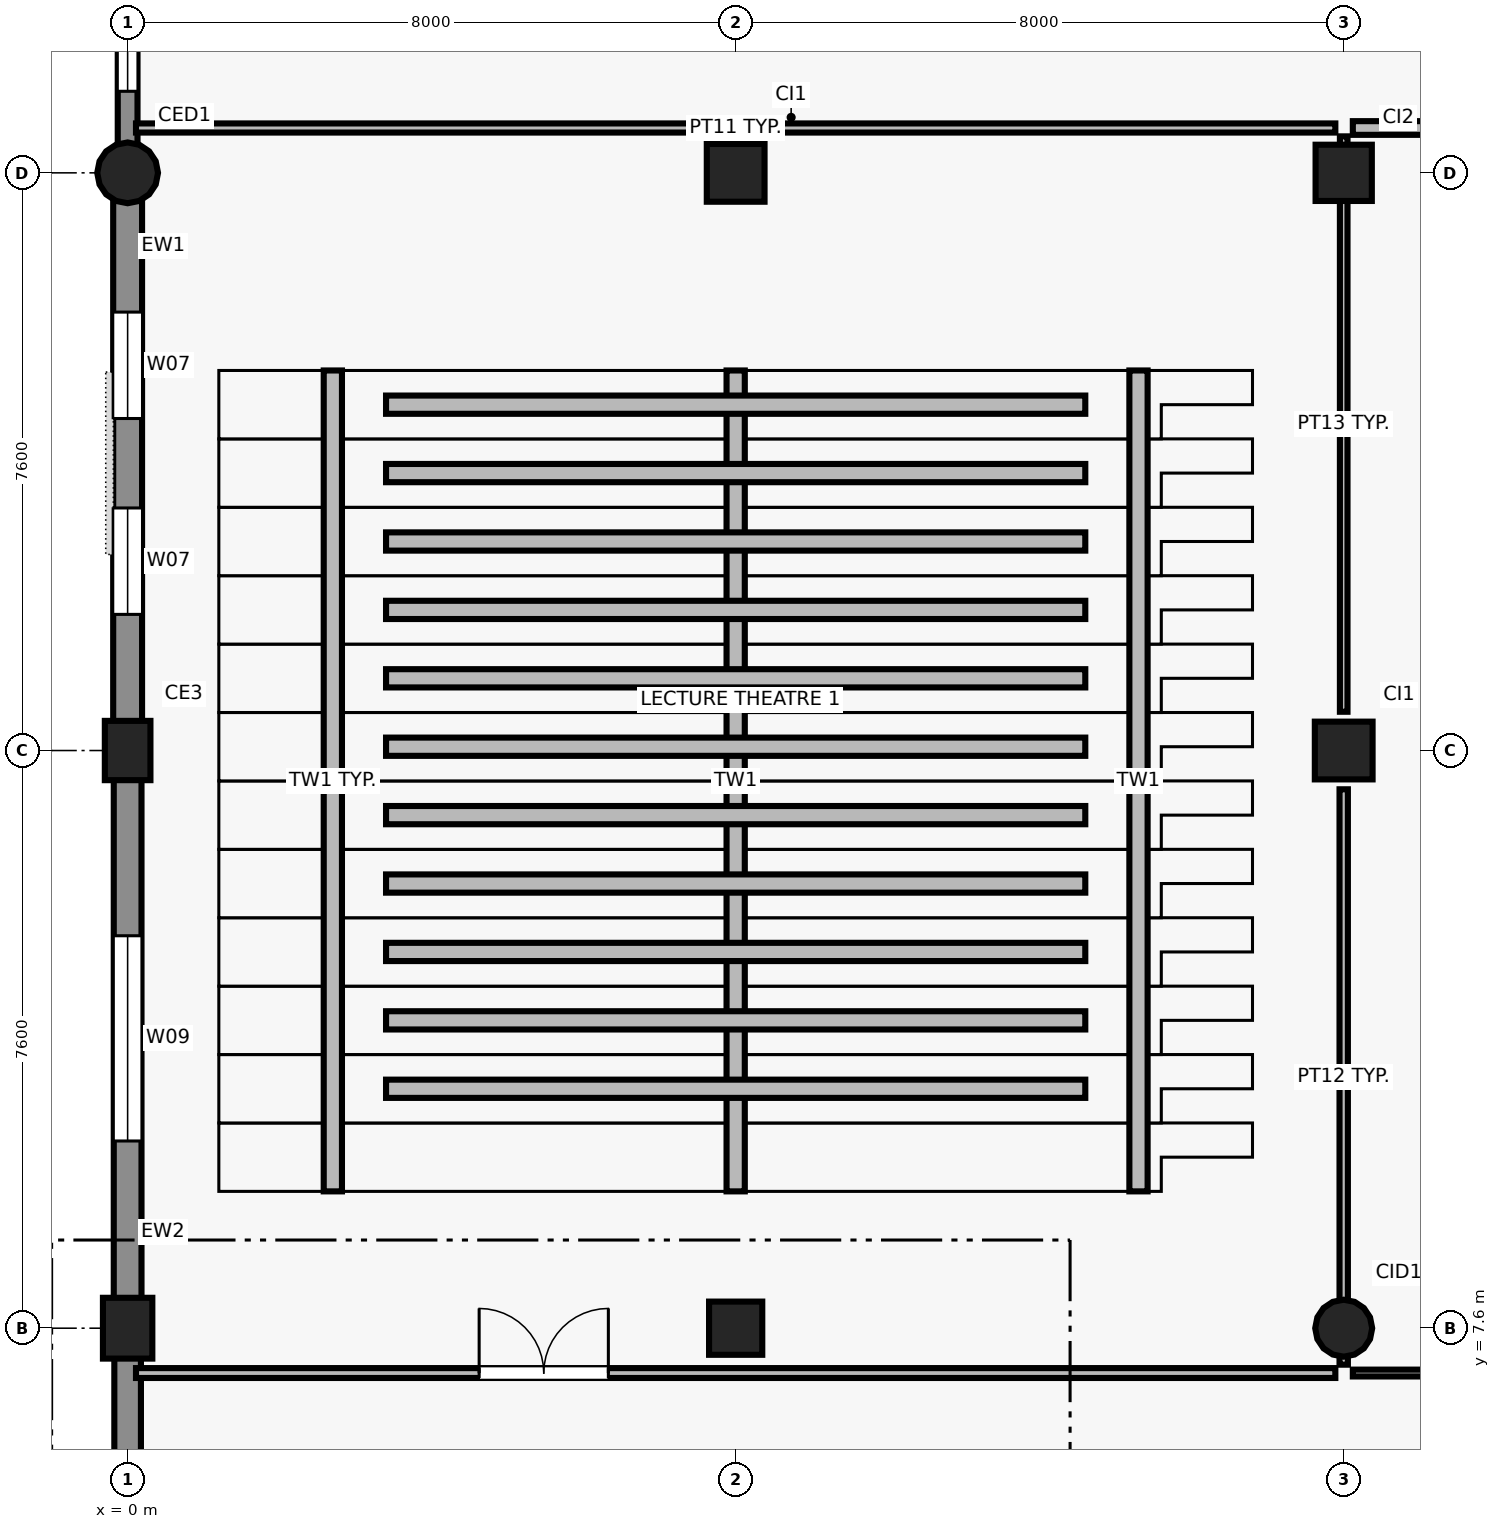
"""IFC4 building model, lengths in metres.
Left out: names, types, materials, properties, quantities, classifications, styles, units other than length and angle.
Written with IfcOpenShell. Run it as: python <this file> out.ifc"""

import sys

from ifc_helpers import new_model, si_unit, direction, frame, frame_2d, origin, origin_2d, place, context, subcontext, project, spatial, polyline, rectangle, circle, outline, extrude, element, fill, save


model = new_model("IFC4")
c1 = context("Model", 3, precision=1e-05, world=origin(), true_north=direction((0.0, 1.0)))
c2 = subcontext(c1, "Body", "Model", "MODEL_VIEW")
j1 = project(units=[si_unit("LENGTHUNIT", "METRE"), si_unit("PLANEANGLEUNIT", "RADIAN")], contexts=[c1])
p1 = place(None, origin())
s1 = spatial("IfcSite", under=j1, at=p1, CompositionType="ELEMENT")
p2 = place(p1, origin())
s2 = spatial("IfcBuilding", under=s1, at=p2, CompositionType="ELEMENT")
p3 = place(p2, origin())
s3 = spatial("IfcBuildingStorey", under=s2, at=p3, CompositionType="ELEMENT", Elevation=0.0)
p4 = place(p3, frame((0.0, 7.6, 0.0), z_axis=(0.0, 0.0, 1.0), x_axis=(1.0, 0.0, 0.0)))
e1 = element("IfcColumn", 1, at=p4, inside=s3, PredefinedType="COLUMN", context=c2, shape_type="SweptSolid", body=[
    extrude(rectangle(XDim=0.8, YDim=0.65, at=origin_2d()), origin(), (0.0, 0.0, 1.0), 4.5),
])
p5 = place(p3, frame((0.0, 15.2, 0.0), z_axis=(0.0, 0.0, 1.0), x_axis=(1.0, 0.0, 0.0)))
e2 = element("IfcColumn", 2, at=p5, inside=s3, PredefinedType="COLUMN", context=c2, shape_type="SweptSolid", body=[
    extrude(rectangle(XDim=0.78, YDim=0.6, at=origin_2d()), origin(), (0.0, 0.0, 1.0), 4.5),
])
p6 = place(p3, frame((0.0, 22.8, 0.0), z_axis=(0.0, 0.0, 1.0), x_axis=(1.0, 0.0, 0.0)))
e3 = element("IfcColumn", 3, at=p6, inside=s3, PredefinedType="COLUMN", context=c2, shape_type="SweptSolid", body=[
    extrude(circle(Radius=0.4, at=origin_2d()), origin(), (0.0, 0.0, 1.0), 4.5),
])
p7 = place(p3, frame((8.0, 7.6, 0.0), z_axis=(0.0, 0.0, 1.0), x_axis=(1.0, 0.0, 0.0)))
e4 = element("IfcColumn", 4, at=p7, inside=s3, PredefinedType="COLUMN", context=c2, shape_type="SweptSolid", body=[
    extrude(rectangle(XDim=0.7, YDim=0.7, at=origin_2d()), origin(), (0.0, 0.0, 1.0), 4.5),
])
p8 = place(p3, frame((8.0, 22.8, 0.0), z_axis=(0.0, 0.0, 1.0), x_axis=(1.0, 0.0, 0.0)))
e5 = element("IfcColumn", 5, at=p8, inside=s3, PredefinedType="COLUMN", context=c2, shape_type="SweptSolid", body=[
    extrude(rectangle(XDim=0.76, YDim=0.76, at=origin_2d()), origin(), (0.0, 0.0, 1.0), 4.5),
])
p9 = place(p3, frame((16.0, 7.6, 0.0), z_axis=(0.0, 0.0, 1.0), x_axis=(1.0, 0.0, 0.0)))
e6 = element("IfcColumn", 6, at=p9, inside=s3, PredefinedType="COLUMN", context=c2, shape_type="SweptSolid", body=[
    extrude(circle(Radius=0.375, at=origin_2d()), origin(), (0.0, 0.0, 1.0), 4.5),
])
p10 = place(p3, frame((16.0, 15.2, 0.0), z_axis=(0.0, 0.0, 1.0), x_axis=(1.0, 0.0, 0.0)))
e7 = element("IfcColumn", 7, at=p10, inside=s3, PredefinedType="COLUMN", context=c2, shape_type="SweptSolid", body=[
    extrude(rectangle(XDim=0.76, YDim=0.76, at=origin_2d()), origin(), (0.0, 0.0, 1.0), 4.5),
])
p11 = place(p3, frame((16.0, 22.8, 0.0), z_axis=(0.0, 0.0, 1.0), x_axis=(1.0, 0.0, 0.0)))
e8 = element("IfcColumn", 8, at=p11, inside=s3, PredefinedType="COLUMN", context=c2, shape_type="SweptSolid", body=[
    extrude(rectangle(XDim=0.74, YDim=0.74, at=origin_2d()), origin(), (0.0, 0.0, 1.0), 4.5),
])
for number, where, z_axis, x_axis in (
    (9, (2.7, 9.4, 0.0), (0.0, 0.0, 1.0), (0.0, 1.0, 0.0)),
    (10, (8.0, 9.4, 0.0), (0.0, 0.0, 1.0), (0.0, 1.0, 0.0)),
    (11, (13.3, 9.4, 0.0), (0.0, 0.0, 1.0), (0.0, 1.0, 0.0)),
):
    element("IfcWall", number, at=place(p3, frame(where, z_axis=z_axis, x_axis=x_axis)), inside=s3, PredefinedType="SOLIDWALL", context=c2, shape_type="SweptSolid", body=[
        extrude(outline(polyline([(0.0, 0.0), (10.8, 0.0), (10.8, 1.615), (0.0, 0.05), (0.0, 0.0)])), frame((0.0, 0.12, 0.0), z_axis=(0.0, -1.0, 0.0), x_axis=(1.0, 0.0, 0.0)), (0.0, 0.0, 1.0), 0.24),
    ])
p12 = place(p3, frame((3.4, 10.75, 0.0), z_axis=(0.0, 0.0, 1.0), x_axis=(1.0, 0.0, 0.0)))
e12 = element("IfcWall", 12, at=p12, inside=s3, PredefinedType="SOLIDWALL", context=c2, shape_type="SweptSolid", body=[
    extrude(rectangle(XDim=9.2, YDim=0.24, at=frame_2d((4.6, 0.0))), origin(), (0.0, 0.0, 1.0), 0.115),
])
p13 = place(p3, frame((3.4, 11.65, 0.0), z_axis=(0.0, 0.0, 1.0), x_axis=(1.0, 0.0, 0.0)))
e13 = element("IfcWall", 13, at=p13, inside=s3, PredefinedType="SOLIDWALL", context=c2, shape_type="SweptSolid", body=[
    extrude(rectangle(XDim=9.2, YDim=0.24, at=frame_2d((4.6, 0.0))), origin(), (0.0, 0.0, 1.0), 0.265),
])
p14 = place(p3, frame((3.4, 12.55, 0.0), z_axis=(0.0, 0.0, 1.0), x_axis=(1.0, 0.0, 0.0)))
e14 = element("IfcWall", 14, at=p14, inside=s3, PredefinedType="SOLIDWALL", context=c2, shape_type="SweptSolid", body=[
    extrude(rectangle(XDim=9.2, YDim=0.24, at=frame_2d((4.6, 0.0))), origin(), (0.0, 0.0, 1.0), 0.415),
])
p15 = place(p3, frame((3.4, 13.45, 0.0), z_axis=(0.0, 0.0, 1.0), x_axis=(1.0, 0.0, 0.0)))
e15 = element("IfcWall", 15, at=p15, inside=s3, PredefinedType="SOLIDWALL", context=c2, shape_type="SweptSolid", body=[
    extrude(rectangle(XDim=9.2, YDim=0.24, at=frame_2d((4.6, 0.0))), origin(), (0.0, 0.0, 1.0), 0.565),
])
p16 = place(p3, frame((3.4, 14.35, 0.0), z_axis=(0.0, 0.0, 1.0), x_axis=(1.0, 0.0, 0.0)))
e16 = element("IfcWall", 16, at=p16, inside=s3, PredefinedType="SOLIDWALL", context=c2, shape_type="SweptSolid", body=[
    extrude(rectangle(XDim=9.2, YDim=0.24, at=frame_2d((4.6, 0.0))), origin(), (0.0, 0.0, 1.0), 0.715),
])
p17 = place(p3, frame((3.4, 15.25, 0.0), z_axis=(0.0, 0.0, 1.0), x_axis=(1.0, 0.0, 0.0)))
e17 = element("IfcWall", 17, at=p17, inside=s3, PredefinedType="SOLIDWALL", context=c2, shape_type="SweptSolid", body=[
    extrude(rectangle(XDim=9.2, YDim=0.24, at=frame_2d((4.6, 0.0))), origin(), (0.0, 0.0, 1.0), 0.865),
])
p18 = place(p3, frame((3.4, 16.15, 0.0), z_axis=(0.0, 0.0, 1.0), x_axis=(1.0, 0.0, 0.0)))
e18 = element("IfcWall", 18, at=p18, inside=s3, PredefinedType="SOLIDWALL", context=c2, shape_type="SweptSolid", body=[
    extrude(rectangle(XDim=9.2, YDim=0.24, at=frame_2d((4.6, 0.0))), origin(), (0.0, 0.0, 1.0), 1.015),
])
p19 = place(p3, frame((3.4, 17.05, 0.0), z_axis=(0.0, 0.0, 1.0), x_axis=(1.0, 0.0, 0.0)))
e19 = element("IfcWall", 19, at=p19, inside=s3, PredefinedType="SOLIDWALL", context=c2, shape_type="SweptSolid", body=[
    extrude(rectangle(XDim=9.2, YDim=0.24, at=frame_2d((4.6, 0.0))), origin(), (0.0, 0.0, 1.0), 1.165),
])
p20 = place(p3, frame((3.4, 17.95, 0.0), z_axis=(0.0, 0.0, 1.0), x_axis=(1.0, 0.0, 0.0)))
e20 = element("IfcWall", 20, at=p20, inside=s3, PredefinedType="SOLIDWALL", context=c2, shape_type="SweptSolid", body=[
    extrude(rectangle(XDim=9.2, YDim=0.24, at=frame_2d((4.6, 0.0))), origin(), (0.0, 0.0, 1.0), 1.315),
])
p21 = place(p3, frame((3.4, 18.85, 0.0), z_axis=(0.0, 0.0, 1.0), x_axis=(1.0, 0.0, 0.0)))
e21 = element("IfcWall", 21, at=p21, inside=s3, PredefinedType="SOLIDWALL", context=c2, shape_type="SweptSolid", body=[
    extrude(rectangle(XDim=9.2, YDim=0.24, at=frame_2d((4.6, 0.0))), origin(), (0.0, 0.0, 1.0), 1.465),
])
p22 = place(p3, frame((3.4, 19.75, 0.0), z_axis=(0.0, 0.0, 1.0), x_axis=(1.0, 0.0, 0.0)))
e22 = element("IfcWall", 22, at=p22, inside=s3, PredefinedType="SOLIDWALL", context=c2, shape_type="SweptSolid", body=[
    extrude(rectangle(XDim=9.2, YDim=0.24, at=frame_2d((4.6, 0.0))), origin(), (0.0, 0.0, 1.0), 1.615),
])
p23 = place(p3, frame((0.0, 30.005, 0.0), z_axis=(0.0, 0.0, 1.0), x_axis=(0.0, -1.0, 0.0)))
e23 = element("IfcWall", 23, at=p23, inside=s3, PredefinedType="SOLIDWALL", context=c2, shape_type="SweptSolid", body=[
    extrude(rectangle(XDim=6.869, YDim=0.26, at=frame_2d((3.435, 0.0))), origin(), (0.0, 0.0, 1.0), 3.6),
])
p24 = place(p23, frame((0.998, 0.0, 0.9)))
e24 = element("IfcOpeningElement", 24, at=p24, cuts=e23, PredefinedType="OPENING", context=c2, shape_type="SweptSolid", body=[
    extrude(rectangle(XDim=1.8, YDim=1.8, at=frame_2d((0.9, 0.9))), frame((0.0, 0.14, 0.0), z_axis=(0.0, -1.0, 0.0), x_axis=(1.0, 0.0, 0.0)), (0.0, 0.0, 1.0), 0.28),
])
p25 = place(p23, frame((4.532, 0.0, 0.9)))
e25 = element("IfcOpeningElement", 25, at=p25, cuts=e23, PredefinedType="OPENING", context=c2, shape_type="SweptSolid", body=[
    extrude(rectangle(XDim=1.6, YDim=1.8, at=frame_2d((0.8, 0.9))), frame((0.0, 0.14, 0.0), z_axis=(0.0, -1.0, 0.0), x_axis=(1.0, 0.0, 0.0)), (0.0, 0.0, 1.0), 0.28),
])
p26 = place(p3, frame((0.0, 22.464, 0.0), z_axis=(0.0, 0.0, 1.0), x_axis=(0.0, -1.0, 0.0)))
e26 = element("IfcWall", 26, at=p26, inside=s3, PredefinedType="SOLIDWALL", context=c2, shape_type="SweptSolid", body=[
    extrude(rectangle(XDim=6.969, YDim=0.38, at=frame_2d((3.484, 0.0))), origin(), (0.0, 0.0, 1.0), 3.78),
])
p27 = place(p26, frame((1.496, 0.0, 0.9)))
e27 = element("IfcOpeningElement", 27, at=p27, cuts=e26, PredefinedType="OPENING", context=c2, shape_type="SweptSolid", body=[
    extrude(rectangle(XDim=1.4, YDim=1.8, at=frame_2d((0.7, 0.9))), frame((0.0, 0.2, 0.0), z_axis=(0.0, -1.0, 0.0), x_axis=(1.0, 0.0, 0.0)), (0.0, 0.0, 1.0), 0.4),
])
p28 = place(p26, frame((4.073, 0.0, 0.9)))
e28 = element("IfcOpeningElement", 28, at=p28, cuts=e26, PredefinedType="OPENING", context=c2, shape_type="SweptSolid", body=[
    extrude(rectangle(XDim=1.4, YDim=1.8, at=frame_2d((0.7, 0.9))), frame((0.0, 0.2, 0.0), z_axis=(0.0, -1.0, 0.0), x_axis=(1.0, 0.0, 0.0)), (0.0, 0.0, 1.0), 0.4),
])
p29 = place(p3, frame((0.0, 14.905, 0.0), z_axis=(0.0, 0.0, 1.0), x_axis=(0.0, -1.0, 0.0)))
e29 = element("IfcWall", 29, at=p29, inside=s3, PredefinedType="SOLIDWALL", context=c2, shape_type="SweptSolid", body=[
    extrude(rectangle(XDim=6.985, YDim=0.365, at=frame_2d((3.493, 0.0))), origin(), (0.0, 0.0, 1.0), 3.76),
])
p30 = place(p29, frame((2.142, 0.0, 0.9)))
e30 = element("IfcOpeningElement", 30, at=p30, cuts=e29, PredefinedType="OPENING", context=c2, shape_type="SweptSolid", body=[
    extrude(rectangle(XDim=2.7, YDim=1.5, at=frame_2d((1.35, 0.75))), frame((0.0, 0.192, 0.0), z_axis=(0.0, -1.0, 0.0), x_axis=(1.0, 0.0, 0.0)), (0.0, 0.0, 1.0), 0.385),
])
p31 = place(p3, frame((0.0, 7.28, 0.0), z_axis=(0.0, 0.0, 1.0), x_axis=(0.0, -1.0, 0.0)))
e31 = element("IfcWall", 31, at=p31, inside=s3, PredefinedType="SOLIDWALL", context=c2, shape_type="SweptSolid", body=[
    extrude(rectangle(XDim=6.885, YDim=0.35, at=frame_2d((3.442, 0.0))), origin(), (0.0, 0.0, 1.0), 3.7),
])
p32 = place(p3, frame((0.11, 7.01, 0.0), z_axis=(0.0, 0.0, 1.0), x_axis=(1.0, 0.0, 0.0)))
e32 = element("IfcWall", 32, at=p32, inside=s3, PredefinedType="PARTITIONING", context=c2, shape_type="SweptSolid", body=[
    extrude(rectangle(XDim=15.78, YDim=0.13, at=frame_2d((7.89, 0.0))), origin(), (0.0, 0.0, 1.0), 4.2),
])
p33 = place(p32, frame((4.515, 0.0, 0.0)))
e33 = element("IfcOpeningElement", 33, at=p33, cuts=e32, PredefinedType="OPENING", context=c2, shape_type="SweptSolid", body=[
    extrude(rectangle(XDim=1.7, YDim=2.3, at=frame_2d((0.85, 1.15))), frame((0.0, 0.075, 0.0), z_axis=(0.0, -1.0, 0.0), x_axis=(1.0, 0.0, 0.0)), (0.0, 0.0, 1.0), 0.15),
])
p34 = place(p3, frame((0.11, 23.39, 0.0), z_axis=(0.0, 0.0, 1.0), x_axis=(1.0, 0.0, 0.0)))
e34 = element("IfcWall", 34, at=p34, inside=s3, PredefinedType="PARTITIONING", context=c2, shape_type="SweptSolid", body=[
    extrude(rectangle(XDim=15.78, YDim=0.12, at=frame_2d((7.89, 0.0))), origin(), (0.0, 0.0, 1.0), 4.2),
])
p35 = place(p3, frame((16.0, 7.12, 0.0), z_axis=(0.0, 0.0, 1.0), x_axis=(0.0, 1.0, 0.0)))
e35 = element("IfcWall", 35, at=p35, inside=s3, PredefinedType="PARTITIONING", context=c2, shape_type="SweptSolid", body=[
    extrude(rectangle(XDim=7.57, YDim=0.11, at=frame_2d((3.785, 0.0))), origin(), (0.0, 0.0, 1.0), 3.6),
])
p36 = place(p3, frame((16.0, 15.71, 0.0), z_axis=(0.0, 0.0, 1.0), x_axis=(0.0, 1.0, 0.0)))
e36 = element("IfcWall", 36, at=p36, inside=s3, PredefinedType="PARTITIONING", context=c2, shape_type="SweptSolid", body=[
    extrude(rectangle(XDim=7.57, YDim=0.1, at=frame_2d((3.785, 0.0))), origin(), (0.0, 0.0, 1.0), 3.64),
])
p37 = place(p3, frame((16.12, 7.01, 0.0), z_axis=(0.0, 0.0, 1.0), x_axis=(1.0, 0.0, 0.0)))
e37 = element("IfcWall", 37, at=p37, inside=s3, PredefinedType="PARTITIONING", context=c2, shape_type="SweptSolid", body=[
    extrude(rectangle(XDim=15.77, YDim=0.09, at=frame_2d((7.885, 0.0))), origin(), (0.0, 0.0, 1.0), 4.2),
])
p38 = place(p37, frame((4.462, 0.0, 0.0)))
e38 = element("IfcOpeningElement", 38, at=p38, cuts=e37, PredefinedType="OPENING", context=c2, shape_type="SweptSolid", body=[
    extrude(rectangle(XDim=1.8, YDim=2.3, at=frame_2d((0.9, 1.15))), frame((0.0, 0.055, 0.0), z_axis=(0.0, -1.0, 0.0), x_axis=(1.0, 0.0, 0.0)), (0.0, 0.0, 1.0), 0.11),
])
p39 = place(p3, frame((16.12, 23.39, 0.0), z_axis=(0.0, 0.0, 1.0), x_axis=(1.0, 0.0, 0.0)))
e39 = element("IfcWall", 39, at=p39, inside=s3, PredefinedType="PARTITIONING", context=c2, shape_type="SweptSolid", body=[
    extrude(rectangle(XDim=15.77, YDim=0.18, at=frame_2d((7.885, 0.0))), origin(), (0.0, 0.0, 1.0), 4.2),
])
p40 = place(p25, origin())
e40 = element("IfcWindow", 40, at=p40, inside=s3, PartitioningType="SINGLE_PANEL", PredefinedType="WINDOW", context=c2, shape_type="SweptSolid", body=[
    extrude(rectangle(XDim=1.6, YDim=1.8, at=frame_2d((0.8, 0.9))), frame((0.0, 0.03, 0.0), z_axis=(0.0, -1.0, 0.0), x_axis=(1.0, 0.0, 0.0)), (0.0, 0.0, 1.0), 0.06),
])
fill(e25, e40)
p41 = place(p27, origin())
e41 = element("IfcWindow", 41, at=p41, inside=s3, PartitioningType="SINGLE_PANEL", PredefinedType="WINDOW", context=c2, shape_type="SweptSolid", body=[
    extrude(rectangle(XDim=1.4, YDim=1.8, at=frame_2d((0.7, 0.9))), frame((0.0, 0.03, 0.0), z_axis=(0.0, -1.0, 0.0), x_axis=(1.0, 0.0, 0.0)), (0.0, 0.0, 1.0), 0.06),
])
fill(e27, e41)
p42 = place(p28, origin())
e42 = element("IfcWindow", 42, at=p42, inside=s3, PartitioningType="SINGLE_PANEL", PredefinedType="WINDOW", context=c2, shape_type="SweptSolid", body=[
    extrude(rectangle(XDim=1.4, YDim=1.8, at=frame_2d((0.7, 0.9))), frame((0.0, 0.03, 0.0), z_axis=(0.0, -1.0, 0.0), x_axis=(1.0, 0.0, 0.0)), (0.0, 0.0, 1.0), 0.06),
])
fill(e28, e42)
p43 = place(p30, origin())
e43 = element("IfcWindow", 43, at=p43, inside=s3, PartitioningType="SINGLE_PANEL", PredefinedType="WINDOW", context=c2, shape_type="SweptSolid", body=[
    extrude(rectangle(XDim=2.7, YDim=1.5, at=frame_2d((1.35, 0.75))), frame((0.0, 0.03, 0.0), z_axis=(0.0, -1.0, 0.0), x_axis=(1.0, 0.0, 0.0)), (0.0, 0.0, 1.0), 0.06),
])
fill(e30, e43)
p44 = place(p33, origin())
e44 = element("IfcDoor", 44, at=p44, inside=s3, OperationType="DOUBLE_DOOR_SINGLE_SWING", PredefinedType="DOOR", context=c2, shape_type="SweptSolid", body=[
    extrude(rectangle(XDim=1.7, YDim=2.3, at=frame_2d((0.85, 1.15))), frame((0.0, 0.025, 0.0), z_axis=(0.0, -1.0, 0.0), x_axis=(1.0, 0.0, 0.0)), (0.0, 0.0, 1.0), 0.05),
])
fill(e33, e44)
save(model, sys.argv[1])
